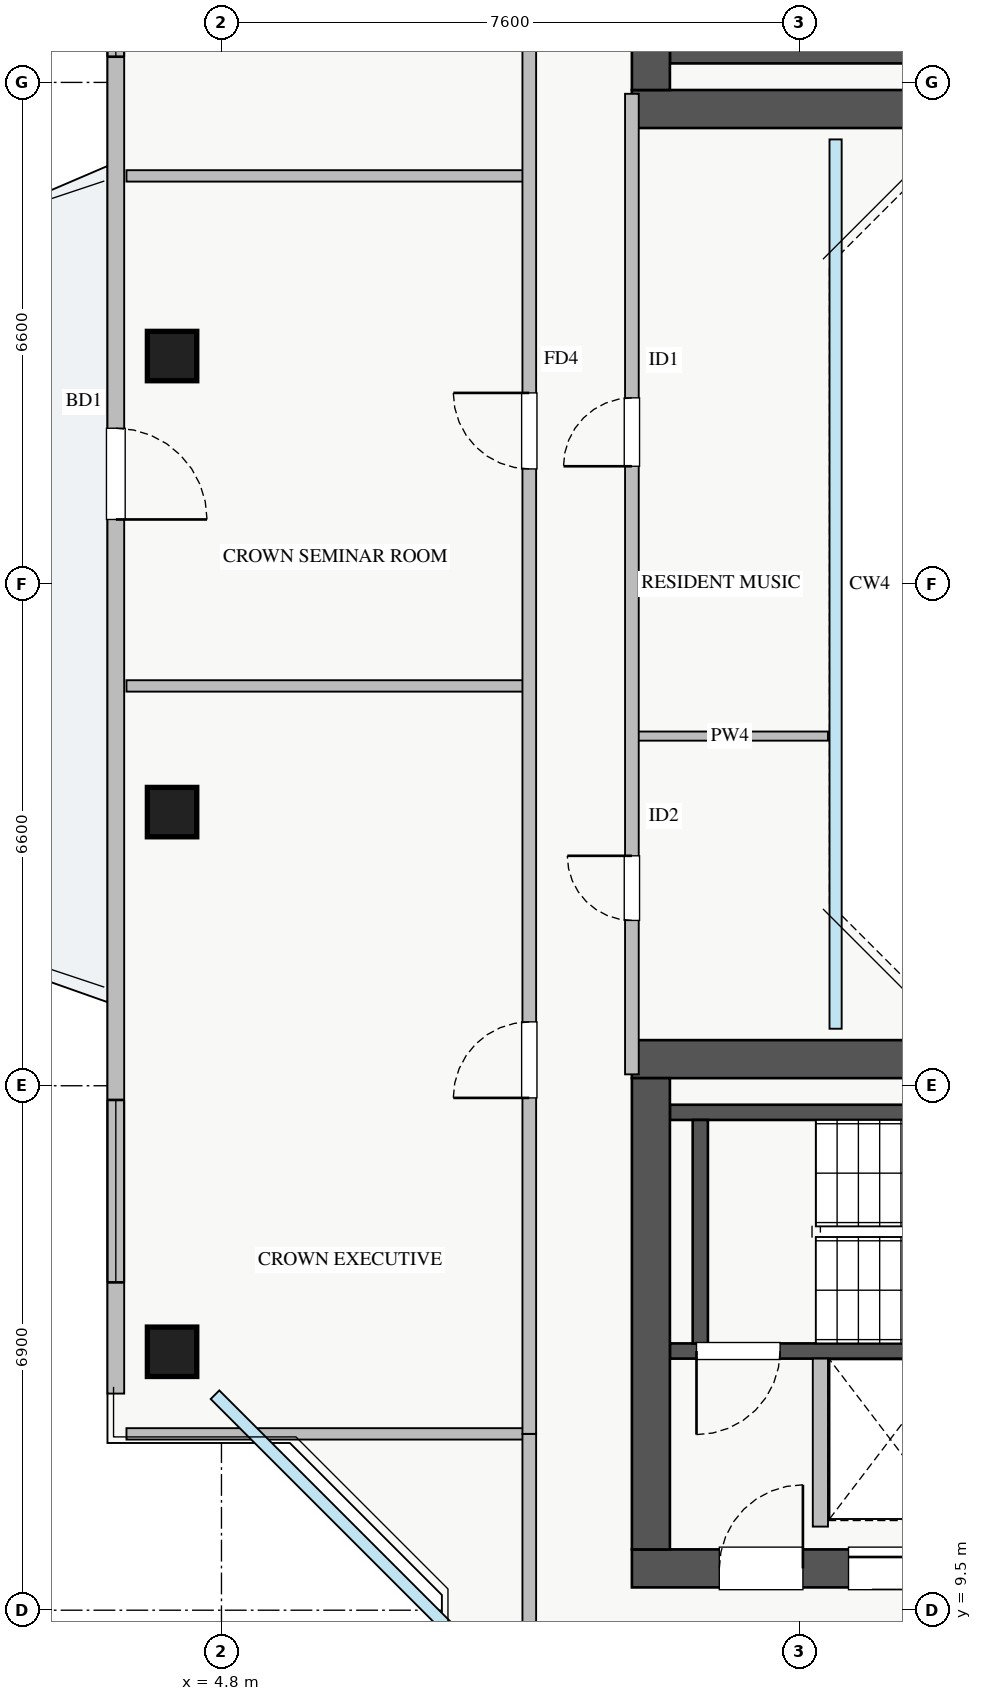
"""IFC4 building model, lengths in metres.
Left out: names, types, materials, properties, quantities, classifications, styles, units other than length and angle.
Written with IfcOpenShell. Run it as: python <this file> out.ifc"""

import sys

from ifc_helpers import new_model, si_unit, direction, frame, frame_2d, origin, origin_2d, place, context, subcontext, project, spatial, rectangle, extrude, source, transform, mapped, element, fill, save


model = new_model("IFC4")
c1 = context("Model", 3, precision=1e-05, world=origin(), true_north=direction((0.0, 1.0)))
c2 = subcontext(c1, "Body", "Model", "MODEL_VIEW")
j1 = project(units=[si_unit("LENGTHUNIT", "METRE"), si_unit("PLANEANGLEUNIT", "RADIAN")], contexts=[c1])
p1 = place(None, origin())
s1 = spatial("IfcSite", under=j1, at=p1, CompositionType="ELEMENT")
p2 = place(p1, origin())
s2 = spatial("IfcBuilding", under=s1, at=p2, CompositionType="ELEMENT")
p3 = place(p2, frame((0.0, 0.0, 237.25)))
s3 = spatial("IfcBuildingStorey", under=s2, at=p3, CompositionType="ELEMENT", Elevation=237.25)
p4 = place(p3, frame((12.68, 12.8, 0.0), z_axis=(0.0, 0.0, 1.0), x_axis=(1.0, 0.0, 0.0)))
e1 = element("IfcWall", 1, at=p4, inside=s3, PredefinedType="SHEAR", context=c2, shape_type="SweptSolid", body=[
    extrude(rectangle(XDim=1.94, YDim=0.18, at=frame_2d((0.97, 0.0))), origin(), (0.0, 0.0, 1.0), 3.07),
])
p5 = place(p3, frame((10.7, 29.95, 0.0), z_axis=(0.0, 0.0, 1.0), x_axis=(1.0, 0.0, 0.0)))
e2 = element("IfcWall", 2, at=p5, inside=s3, PredefinedType="SHEAR", context=c2, shape_type="SweptSolid", body=[
    extrude(rectangle(XDim=7.45, YDim=0.2, at=frame_2d((3.725, 0.0))), origin(), (0.0, 0.0, 1.0), 3.25),
])
p6 = place(p3, frame((10.7, 12.91, 0.0), z_axis=(0.0, 0.0, 1.0), x_axis=(1.0, 0.0, 0.0)))
e3 = element("IfcWall", 3, at=p6, inside=s3, PredefinedType="SHEAR", context=c2, shape_type="SweptSolid", body=[
    extrude(rectangle(XDim=7.45, YDim=0.2, at=frame_2d((3.725, 0.0))), origin(), (0.0, 0.0, 1.0), 3.25),
])
p7 = place(p6, frame((0.35, 0.0, 0.0)))
e4 = element("IfcOpeningElement", 4, at=p7, cuts=e3, PredefinedType="OPENING", context=c2, shape_type="SweptSolid", body=[
    extrude(rectangle(XDim=1.1, YDim=2.05, at=frame_2d((0.55, 1.025))), frame((0.0, 0.11, 0.0), z_axis=(0.0, -1.0, 0.0), x_axis=(1.0, 0.0, 0.0)), (0.0, 0.0, 1.0), 0.22),
])
p8 = place(p3, frame((10.7, 16.05, 0.0), z_axis=(0.0, 0.0, 1.0), x_axis=(1.0, 0.0, 0.0)))
e5 = element("IfcWall", 5, at=p8, inside=s3, PredefinedType="SHEAR", context=c2, shape_type="SweptSolid", body=[
    extrude(rectangle(XDim=7.45, YDim=0.2, at=frame_2d((3.725, 0.0))), origin(), (0.0, 0.0, 1.0), 3.25),
])
p9 = place(p3, frame((11.1, 13.01, 0.0), z_axis=(0.0, 0.0, 1.0), x_axis=(0.0, 1.0, 0.0)))
e6 = element("IfcWall", 6, at=p9, inside=s3, PredefinedType="SHEAR", context=c2, shape_type="SweptSolid", body=[
    extrude(rectangle(XDim=2.94, YDim=0.2, at=frame_2d((1.47, 0.0))), origin(), (0.0, 0.0, 1.0), 3.25),
])
p10 = place(p3, frame((10.2, 29.25, 0.0), z_axis=(0.0, 0.0, 1.0), x_axis=(1.0, 0.0, 0.0)))
e7 = element("IfcWall", 7, at=p10, inside=s3, PredefinedType="SHEAR", context=c2, shape_type="SweptSolid", body=[
    extrude(rectangle(XDim=17.6, YDim=0.5, at=frame_2d((8.8, 0.0))), origin(), (0.0, 0.0, 1.0), 3.25),
])
p11 = place(p3, frame((10.45, 29.5, 0.0), z_axis=(0.0, 0.0, 1.0), x_axis=(0.0, 1.0, 0.0)))
e8 = element("IfcWall", 8, at=p11, inside=s3, PredefinedType="SHEAR", context=c2, shape_type="SweptSolid", body=[
    extrude(rectangle(XDim=6.2, YDim=0.5, at=frame_2d((3.1, 0.0))), origin(), (0.0, 0.0, 1.0), 3.25),
])
p12 = place(p3, frame((10.2, 10.05, 0.0), z_axis=(0.0, 0.0, 1.0), x_axis=(1.0, 0.0, 0.0)))
e9 = element("IfcWall", 9, at=p12, inside=s3, PredefinedType="SHEAR", context=c2, shape_type="SweptSolid", body=[
    extrude(rectangle(XDim=17.6, YDim=0.5, at=frame_2d((8.8, 0.0))), origin(), (0.0, 0.0, 1.0), 3.25),
])
p13 = place(p12, frame((1.15, 0.0, 0.0)))
e10 = element("IfcOpeningElement", 10, at=p13, cuts=e9, PredefinedType="OPENING", context=c2, shape_type="SweptSolid", body=[
    extrude(rectangle(XDim=1.1, YDim=2.05, at=frame_2d((0.55, 1.025))), frame((0.0, 0.26, 0.0), z_axis=(0.0, -1.0, 0.0), x_axis=(1.0, 0.0, 0.0)), (0.0, 0.0, 1.0), 0.52),
])
p14 = place(p12, frame((8.3, 0.0, 0.0)))
e11 = element("IfcOpeningElement", 11, at=p14, cuts=e9, PredefinedType="OPENING", context=c2, shape_type="SweptSolid", body=[
    extrude(rectangle(XDim=1.1, YDim=2.05, at=frame_2d((0.55, 1.025))), frame((0.0, 0.26, 0.0), z_axis=(0.0, -1.0, 0.0), x_axis=(1.0, 0.0, 0.0)), (0.0, 0.0, 1.0), 0.52),
])
p15 = place(p12, frame((2.85, 0.0, 0.0)))
e12 = element("IfcOpeningElement", 12, at=p15, cuts=e9, PredefinedType="OPENING", context=c2, shape_type="SweptSolid", body=[
    extrude(rectangle(XDim=1.1, YDim=2.05, at=frame_2d((0.55, 1.025))), frame((0.0, 0.26, 0.0), z_axis=(0.0, -1.0, 0.0), x_axis=(1.0, 0.0, 0.0)), (0.0, 0.0, 1.0), 0.52),
])
p16 = place(p12, frame((5.8, 0.0, 0.0)))
e13 = element("IfcOpeningElement", 13, at=p16, cuts=e9, PredefinedType="OPENING", context=c2, shape_type="SweptSolid", body=[
    extrude(rectangle(XDim=1.0, YDim=2.05, at=frame_2d((0.5, 1.025))), frame((0.0, 0.26, 0.0), z_axis=(0.0, -1.0, 0.0), x_axis=(1.0, 0.0, 0.0)), (0.0, 0.0, 1.0), 0.52),
])
p17 = place(p12, frame((14.74, 0.0, 0.0)))
e14 = element("IfcOpeningElement", 14, at=p17, cuts=e9, PredefinedType="OPENING", context=c2, shape_type="SweptSolid", body=[
    extrude(rectangle(XDim=1.0, YDim=2.05, at=frame_2d((0.5, 1.025))), frame((0.0, 0.26, 0.0), z_axis=(0.0, -1.0, 0.0), x_axis=(1.0, 0.0, 0.0)), (0.0, 0.0, 1.0), 0.52),
])
p18 = place(p12, frame((11.67, 0.0, 0.0)))
e15 = element("IfcOpeningElement", 15, at=p18, cuts=e9, PredefinedType="OPENING", context=c2, shape_type="SweptSolid", body=[
    extrude(rectangle(XDim=1.0, YDim=2.05, at=frame_2d((0.5, 1.025))), frame((0.0, 0.26, 0.0), z_axis=(0.0, -1.0, 0.0), x_axis=(1.0, 0.0, 0.0)), (0.0, 0.0, 1.0), 0.52),
])
p19 = place(p3, frame((10.2, 16.75, 0.0), z_axis=(0.0, 0.0, 1.0), x_axis=(1.0, 0.0, 0.0)))
e16 = element("IfcWall", 16, at=p19, inside=s3, PredefinedType="SHEAR", context=c2, shape_type="SweptSolid", body=[
    extrude(rectangle(XDim=17.6, YDim=0.5, at=frame_2d((8.8, 0.0))), origin(), (0.0, 0.0, 1.0), 3.25),
])
p20 = place(p3, frame((10.45, 10.3, 0.0), z_axis=(0.0, 0.0, 1.0), x_axis=(0.0, 1.0, 0.0)))
e17 = element("IfcWall", 17, at=p20, inside=s3, PredefinedType="SHEAR", context=c2, shape_type="SweptSolid", body=[
    extrude(rectangle(XDim=6.2, YDim=0.5, at=frame_2d((3.1, 0.0))), origin(), (0.0, 0.0, 1.0), 3.25),
])
m1 = source(origin(), c2, "Body", "SweptSolid", [
    extrude(rectangle(XDim=0.65, YDim=0.65, at=origin_2d()), origin(), (0.0, 0.0, 1.0), 3.25),
])
for number, where, z_axis, x_axis in (
    (18, (4.15, 26.0, 0.0), (0.0, 0.0, 1.0), (1.0, 0.0, 0.0)),
    (19, (4.15, 20.0, 0.0), (0.0, 0.0, 1.0), (1.0, 0.0, 0.0)),
    (20, (4.15, 12.9, 0.0), (0.0, 0.0, 1.0), (1.0, 0.0, 0.0)),
):
    element("IfcColumn", number, at=place(p3, frame(where, z_axis=z_axis, x_axis=x_axis)), inside=s3, PredefinedType="COLUMN", context=c2, shape_type="MappedRepresentation", body=[
        mapped(m1, transform((0.0, 0.0, 0.0), x_axis=(1.0, 0.0, 0.0), y_axis=(0.0, 1.0, 0.0), z_axis=(0.0, 0.0, 1.0), scale=1.0)),
    ])
p21 = place(p3, frame((3.41, 12.35, 0.0), z_axis=(0.0, 0.0, 1.0), x_axis=(0.0, 1.0, 0.0)))
e21 = element("IfcWall", 21, at=p21, inside=s3, PredefinedType="STANDARD", context=c2, shape_type="SweptSolid", body=[
    extrude(rectangle(XDim=21.3, YDim=0.22, at=frame_2d((10.65, 0.0))), origin(), (0.0, 0.0, 1.0), 2.61),
])
p22 = place(p21, frame((11.5, 0.0, 0.0)))
e22 = element("IfcOpeningElement", 22, at=p22, cuts=e21, PredefinedType="OPENING", context=c2, shape_type="SweptSolid", body=[
    extrude(rectangle(XDim=1.2, YDim=2.1, at=frame_2d((0.6, 1.05))), frame((0.0, 0.12, 0.0), z_axis=(0.0, -1.0, 0.0), x_axis=(1.0, 0.0, 0.0)), (0.0, 0.0, 1.0), 0.24),
])
p23 = place(p21, frame((1.463, 0.0, 0.9)))
e23 = element("IfcOpeningElement", 23, at=p23, cuts=e21, PredefinedType="OPENING", context=c2, shape_type="SweptSolid", body=[
    extrude(rectangle(XDim=2.4, YDim=1.48, at=frame_2d((1.2, 0.74))), frame((0.0, 0.12, 0.0), z_axis=(0.0, -1.0, 0.0), x_axis=(1.0, 0.0, 0.0)), (0.0, 0.0, 1.0), 0.24),
])
p24 = place(p21, frame((17.588, 0.0, 0.9)))
e24 = element("IfcOpeningElement", 24, at=p24, cuts=e21, PredefinedType="OPENING", context=c2, shape_type="SweptSolid", body=[
    extrude(rectangle(XDim=2.1, YDim=1.48, at=frame_2d((1.05, 0.74))), frame((0.0, 0.12, 0.0), z_axis=(0.0, -1.0, 0.0), x_axis=(1.0, 0.0, 0.0)), (0.0, 0.0, 1.0), 0.24),
])
p25 = place(p3, frame((12.68, 10.6, 0.0), z_axis=(0.0, 0.0, 1.0), x_axis=(0.0, 1.0, 0.0)))
e25 = element("IfcWall", 25, at=p25, inside=s3, PredefinedType="PARTITIONING", context=c2, shape_type="SweptSolid", body=[
    extrude(rectangle(XDim=2.21, YDim=0.2, at=frame_2d((1.105, 0.0))), origin(), (0.0, 0.0, 1.0), 3.07),
])
p26 = place(p3, frame((3.55, 11.82, 0.0), z_axis=(0.0, 0.0, 1.0), x_axis=(1.0, 0.0, 0.0)))
e26 = element("IfcWall", 26, at=p26, inside=s3, PredefinedType="PARTITIONING", context=c2, shape_type="SweptSolid", body=[
    extrude(rectangle(XDim=5.3, YDim=0.15, at=frame_2d((2.65, 0.0))), origin(), (0.0, 0.0, 1.0), 3.07),
])
p27 = place(p3, frame((8.85, 8.56, 0.0), z_axis=(0.0, 0.0, 1.0), x_axis=(0.0, 1.0, 0.0)))
e27 = element("IfcWall", 27, at=p27, inside=s3, PredefinedType="PARTITIONING", context=c2, shape_type="SweptSolid", body=[
    extrude(rectangle(XDim=3.26, YDim=0.18, at=frame_2d((1.63, 0.0))), origin(), (0.0, 0.0, 1.0), 2.569),
])
p28 = place(p3, frame((3.55, 21.66, 0.0), z_axis=(0.0, 0.0, 1.0), x_axis=(1.0, 0.0, 0.0)))
e28 = element("IfcWall", 28, at=p28, inside=s3, PredefinedType="PARTITIONING", context=c2, shape_type="SweptSolid", body=[
    extrude(rectangle(XDim=5.3, YDim=0.15, at=frame_2d((2.65, 0.0))), origin(), (0.0, 0.0, 1.0), 2.715),
])
p29 = place(p3, frame((3.55, 28.37, 0.0), z_axis=(0.0, 0.0, 1.0), x_axis=(1.0, 0.0, 0.0)))
e29 = element("IfcWall", 29, at=p29, inside=s3, PredefinedType="PARTITIONING", context=c2, shape_type="SweptSolid", body=[
    extrude(rectangle(XDim=5.3, YDim=0.15, at=frame_2d((2.65, 0.0))), origin(), (0.0, 0.0, 1.0), 3.07),
])
p30 = place(p3, frame((8.85, 11.82, 0.0), z_axis=(0.0, 0.0, 1.0), x_axis=(0.0, 1.0, 0.0)))
e30 = element("IfcWall", 30, at=p30, inside=s3, PredefinedType="PARTITIONING", context=c2, shape_type="SweptSolid", body=[
    extrude(rectangle(XDim=22.36, YDim=0.18, at=frame_2d((11.18, 0.0))), origin(), (0.0, 0.0, 1.0), 2.569),
])
p31 = place(p30, frame((4.42, 0.0, 0.0)))
e31 = element("IfcOpeningElement", 31, at=p31, cuts=e30, PredefinedType="OPENING", context=c2, shape_type="SweptSolid", body=[
    extrude(rectangle(XDim=1.0, YDim=2.05, at=frame_2d((0.5, 1.025))), frame((0.0, 0.1, 0.0), z_axis=(0.0, -1.0, 0.0), x_axis=(1.0, 0.0, 0.0)), (0.0, 0.0, 1.0), 0.2),
])
p32 = place(p30, frame((12.695, 0.0, 0.0)))
e32 = element("IfcOpeningElement", 32, at=p32, cuts=e30, PredefinedType="OPENING", context=c2, shape_type="SweptSolid", body=[
    extrude(rectangle(XDim=1.0, YDim=2.05, at=frame_2d((0.5, 1.025))), frame((0.0, 0.1, 0.0), z_axis=(0.0, -1.0, 0.0), x_axis=(1.0, 0.0, 0.0)), (0.0, 0.0, 1.0), 0.2),
])
p33 = place(p30, frame((18.955, 0.0, 0.0)))
e33 = element("IfcOpeningElement", 33, at=p33, cuts=e30, PredefinedType="OPENING", context=c2, shape_type="SweptSolid", body=[
    extrude(rectangle(XDim=1.0, YDim=2.05, at=frame_2d((0.5, 1.025))), frame((0.0, 0.1, 0.0), z_axis=(0.0, -1.0, 0.0), x_axis=(1.0, 0.0, 0.0)), (0.0, 0.0, 1.0), 0.2),
])
p34 = place(p3, frame((10.2, 21.0, 0.0), z_axis=(0.0, 0.0, 1.0), x_axis=(1.0, 0.0, 0.0)))
e34 = element("IfcWall", 34, at=p34, inside=s3, PredefinedType="PLUMBINGWALL", context=c2, shape_type="SweptSolid", body=[
    extrude(rectangle(XDim=2.58, YDim=0.12, at=frame_2d((1.29, 0.0))), origin(), (0.0, 0.0, 1.0), 3.07),
])
p35 = place(p3, frame((10.2, 16.55, 0.0), z_axis=(0.0, 0.0, 1.0), x_axis=(0.0, 1.0, 0.0)))
e35 = element("IfcWall", 35, at=p35, inside=s3, PredefinedType="PARTITIONING", context=c2, shape_type="SweptSolid", body=[
    extrude(rectangle(XDim=12.9, YDim=0.18, at=frame_2d((6.45, 0.0))), origin(), (0.0, 0.0, 1.0), 3.07),
])
p36 = place(p35, frame((2.025, 0.0, 0.0)))
e36 = element("IfcOpeningElement", 36, at=p36, cuts=e35, PredefinedType="OPENING", context=c2, shape_type="SweptSolid", body=[
    extrude(rectangle(XDim=0.85, YDim=2.05, at=frame_2d((0.425, 1.025))), frame((0.0, 0.1, 0.0), z_axis=(0.0, -1.0, 0.0), x_axis=(1.0, 0.0, 0.0)), (0.0, 0.0, 1.0), 0.2),
])
p37 = place(p35, frame((8.0, 0.0, 0.0)))
e37 = element("IfcOpeningElement", 37, at=p37, cuts=e35, PredefinedType="OPENING", context=c2, shape_type="SweptSolid", body=[
    extrude(rectangle(XDim=0.9, YDim=2.05, at=frame_2d((0.45, 1.025))), frame((0.0, 0.1, 0.0), z_axis=(0.0, -1.0, 0.0), x_axis=(1.0, 0.0, 0.0)), (0.0, 0.0, 1.0), 0.2),
])
m2 = source(origin(), c2, "Body", "SweptSolid", [
    extrude(rectangle(XDim=1.2, YDim=2.1, at=frame_2d((0.6, 1.05))), frame((0.0, 0.025, 0.0), z_axis=(0.0, -1.0, 0.0), x_axis=(1.0, 0.0, 0.0)), (0.0, 0.0, 1.0), 0.05),
])
p38 = place(p22, frame((1.2, 0.0, 0.0), z_axis=(0.0, 0.0, 1.0), x_axis=(-1.0, 0.0, 0.0)))
e38 = element("IfcDoor", 38, at=p38, inside=s3, OperationType="SINGLE_SWING_LEFT", PredefinedType="DOOR", context=c2, shape_type="MappedRepresentation", body=[
    mapped(m2, transform((0.0, 0.0, 0.0), x_axis=(1.0, 0.0, 0.0), y_axis=(0.0, 1.0, 0.0), z_axis=(0.0, 0.0, 1.0), scale=1.0)),
])
fill(e22, e38)
m3 = source(origin(), c2, "Body", "SweptSolid", [
    extrude(rectangle(XDim=2.4, YDim=1.48, at=frame_2d((1.2, 0.74))), frame((0.0, 0.03, 0.0), z_axis=(0.0, -1.0, 0.0), x_axis=(1.0, 0.0, 0.0)), (0.0, 0.0, 1.0), 0.06),
])
p39 = place(p23, origin())
e39 = element("IfcWindow", 39, at=p39, inside=s3, PartitioningType="TRIPLE_PANEL_VERTICAL", PredefinedType="WINDOW", context=c2, shape_type="MappedRepresentation", body=[
    mapped(m3, transform((0.0, 0.0, 0.0), x_axis=(1.0, 0.0, 0.0), y_axis=(0.0, 1.0, 0.0), z_axis=(0.0, 0.0, 1.0), scale=1.0)),
])
fill(e23, e39)
m4 = source(origin(), c2, "Body", "SweptSolid", [
    extrude(rectangle(XDim=2.1, YDim=1.48, at=frame_2d((1.05, 0.74))), frame((0.0, 0.03, 0.0), z_axis=(0.0, -1.0, 0.0), x_axis=(1.0, 0.0, 0.0)), (0.0, 0.0, 1.0), 0.06),
])
p40 = place(p24, origin())
e40 = element("IfcWindow", 40, at=p40, inside=s3, PartitioningType="TRIPLE_PANEL_VERTICAL", PredefinedType="WINDOW", context=c2, shape_type="MappedRepresentation", body=[
    mapped(m4, transform((0.0, 0.0, 0.0), x_axis=(1.0, 0.0, 0.0), y_axis=(0.0, 1.0, 0.0), z_axis=(0.0, 0.0, 1.0), scale=1.0)),
])
fill(e24, e40)
m5 = source(origin(), c2, "Body", "SweptSolid", [
    extrude(rectangle(XDim=1.1, YDim=2.05, at=frame_2d((0.55, 1.025))), frame((0.0, 0.025, 0.0), z_axis=(0.0, -1.0, 0.0), x_axis=(1.0, 0.0, 0.0)), (0.0, 0.0, 1.0), 0.05),
])
p41 = place(p13, origin())
e41 = element("IfcDoor", 41, at=p41, inside=s3, OperationType="SINGLE_SWING_RIGHT", PredefinedType="DOOR", context=c2, shape_type="MappedRepresentation", body=[
    mapped(m5, transform((0.0, 0.0, 0.0), x_axis=(1.0, 0.0, 0.0), y_axis=(0.0, 1.0, 0.0), z_axis=(0.0, 0.0, 1.0), scale=1.0)),
])
fill(e10, e41)
p42 = place(p7, frame((1.1, 0.0, 0.0), z_axis=(0.0, 0.0, 1.0), x_axis=(-1.0, 0.0, 0.0)))
e42 = element("IfcDoor", 42, at=p42, inside=s3, OperationType="SINGLE_SWING_LEFT", PredefinedType="DOOR", context=c2, shape_type="MappedRepresentation", body=[
    mapped(m5, transform((0.0, 0.0, 0.0), x_axis=(1.0, 0.0, 0.0), y_axis=(0.0, 1.0, 0.0), z_axis=(0.0, 0.0, 1.0), scale=1.0)),
])
fill(e4, e42)
p43 = place(p15, origin())
e43 = element("IfcDoor", 43, at=p43, inside=s3, OperationType="SLIDING_TO_RIGHT", PredefinedType="DOOR", context=c2, shape_type="MappedRepresentation", body=[
    mapped(m5, transform((0.0, 0.0, 0.0), x_axis=(1.0, 0.0, 0.0), y_axis=(0.0, 1.0, 0.0), z_axis=(0.0, 0.0, 1.0), scale=1.0)),
])
fill(e12, e43)
m6 = source(origin(), c2, "Body", "SweptSolid", [
    extrude(rectangle(XDim=1.0, YDim=2.05, at=frame_2d((0.5, 1.025))), frame((0.0, 0.025, 0.0), z_axis=(0.0, -1.0, 0.0), x_axis=(1.0, 0.0, 0.0)), (0.0, 0.0, 1.0), 0.05),
])
p44 = place(p31, origin())
e44 = element("IfcDoor", 44, at=p44, inside=s3, OperationType="SINGLE_SWING_LEFT", PredefinedType="DOOR", context=c2, shape_type="MappedRepresentation", body=[
    mapped(m6, transform((0.0, 0.0, 0.0), x_axis=(1.0, 0.0, 0.0), y_axis=(0.0, 1.0, 0.0), z_axis=(0.0, 0.0, 1.0), scale=1.0)),
])
fill(e31, e44)
p45 = place(p32, origin())
e45 = element("IfcDoor", 45, at=p45, inside=s3, OperationType="SINGLE_SWING_RIGHT", PredefinedType="DOOR", context=c2, shape_type="MappedRepresentation", body=[
    mapped(m6, transform((0.0, 0.0, 0.0), x_axis=(1.0, 0.0, 0.0), y_axis=(0.0, 1.0, 0.0), z_axis=(0.0, 0.0, 1.0), scale=1.0)),
])
fill(e32, e45)
m7 = source(origin(), c2, "Body", "SweptSolid", [
    extrude(rectangle(XDim=0.85, YDim=2.05, at=frame_2d((0.425, 1.025))), frame((0.0, 0.025, 0.0), z_axis=(0.0, -1.0, 0.0), x_axis=(1.0, 0.0, 0.0)), (0.0, 0.0, 1.0), 0.05),
])
p46 = place(p36, origin())
e46 = element("IfcDoor", 46, at=p46, inside=s3, OperationType="SINGLE_SWING_RIGHT", PredefinedType="DOOR", context=c2, shape_type="MappedRepresentation", body=[
    mapped(m7, transform((0.0, 0.0, 0.0), x_axis=(1.0, 0.0, 0.0), y_axis=(0.0, 1.0, 0.0), z_axis=(0.0, 0.0, 1.0), scale=1.0)),
])
fill(e36, e46)
m8 = source(origin(), c2, "Body", "SweptSolid", [
    extrude(rectangle(XDim=0.9, YDim=2.05, at=frame_2d((0.45, 1.025))), frame((0.0, 0.025, 0.0), z_axis=(0.0, -1.0, 0.0), x_axis=(1.0, 0.0, 0.0)), (0.0, 0.0, 1.0), 0.05),
])
p47 = place(p37, origin())
e47 = element("IfcDoor", 47, at=p47, inside=s3, OperationType="SINGLE_SWING_LEFT", PredefinedType="DOOR", context=c2, shape_type="MappedRepresentation", body=[
    mapped(m8, transform((0.0, 0.0, 0.0), x_axis=(1.0, 0.0, 0.0), y_axis=(0.0, 1.0, 0.0), z_axis=(0.0, 0.0, 1.0), scale=1.0)),
])
fill(e37, e47)
save(model, sys.argv[1])
